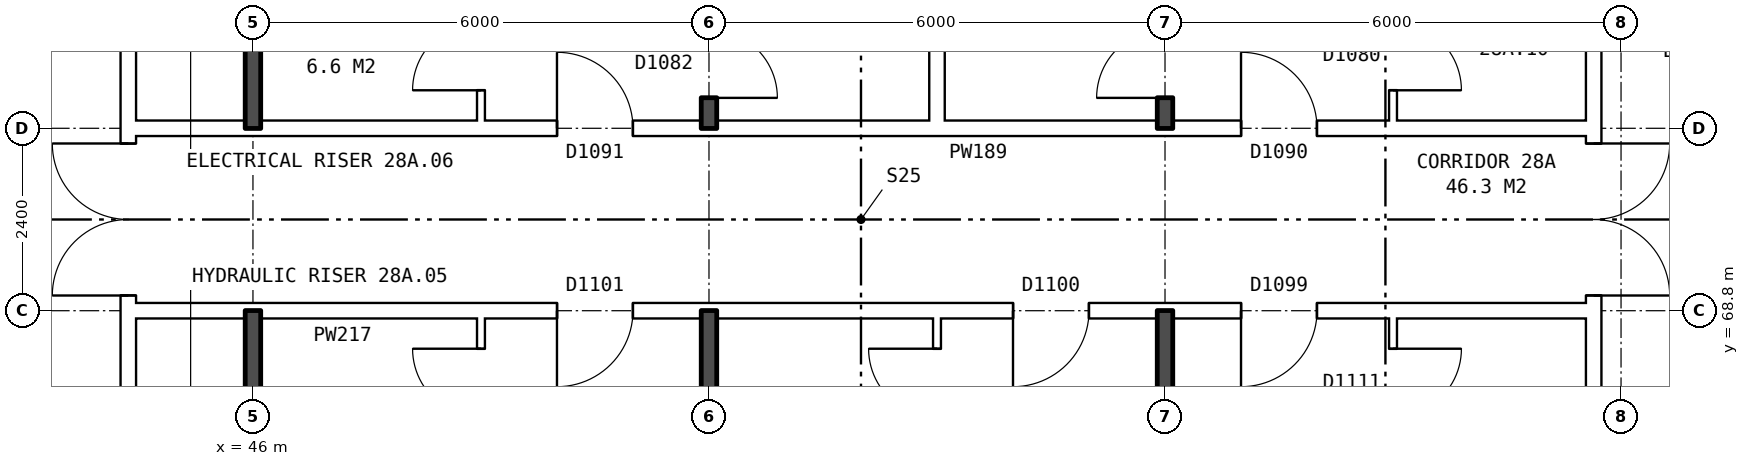
"""IFC4 building model, lengths in metres.
Left out: names, types, materials, properties, quantities, classifications, styles, units other than length and angle.
Written with IfcOpenShell. Run it as: python <this file> out.ifc"""

import sys

from ifc_helpers import new_model, si_unit, direction, frame, frame_2d, origin, place, context, subcontext, project, spatial, rectangle, extrude, element, fill, save


model = new_model("IFC4")
c1 = context("Model", 3, precision=1e-05, world=origin(), true_north=direction((0.0, 1.0)))
c2 = subcontext(c1, "Body", "Model", "MODEL_VIEW")
j1 = project(units=[si_unit("LENGTHUNIT", "METRE"), si_unit("PLANEANGLEUNIT", "RADIAN")], contexts=[c1])
p1 = place(None, origin())
s1 = spatial("IfcSite", under=j1, at=p1, CompositionType="ELEMENT")
p2 = place(p1, origin())
s2 = spatial("IfcBuilding", under=s1, at=p2, CompositionType="ELEMENT")
p3 = place(p2, frame((0.0, 0.0, 102.6)))
s3 = spatial("IfcBuildingStorey", under=s2, at=p3, CompositionType="ELEMENT", Elevation=102.6)
p4 = place(p3, frame((63.64, 63.9, 0.0), z_axis=(0.0, 0.0, 1.0), x_axis=(0.0, 1.0, 0.0)))
e1 = element("IfcWall", 1, at=p4, inside=s3, PredefinedType="PARTITIONING", context=c2, shape_type="SweptSolid", body=[
    extrude(rectangle(XDim=12.2, YDim=0.2, at=frame_2d((6.1, 0.0))), origin(), (0.0, 0.0, 1.0), 2.85),
])
p5 = place(p4, frame((5.1, 0.0, 0.0)))
e2 = element("IfcOpeningElement", 2, at=p5, cuts=e1, PredefinedType="OPENING", context=c2, shape_type="SweptSolid", body=[
    extrude(rectangle(XDim=2.0, YDim=2.1, at=frame_2d((1.0, 1.05))), frame((0.0, 0.11, 0.0), z_axis=(0.0, -1.0, 0.0), x_axis=(1.0, 0.0, 0.0)), (0.0, 0.0, 1.0), 0.22),
])
p6 = place(p3, frame((44.36, 63.9, 0.0), z_axis=(0.0, 0.0, 1.0), x_axis=(0.0, 1.0, 0.0)))
e3 = element("IfcWall", 3, at=p6, inside=s3, PredefinedType="PARTITIONING", context=c2, shape_type="SweptSolid", body=[
    extrude(rectangle(XDim=12.2, YDim=0.2, at=frame_2d((6.1, 0.0))), origin(), (0.0, 0.0, 1.0), 2.85),
])
p7 = place(p6, frame((5.1, 0.0, 0.0)))
e4 = element("IfcOpeningElement", 4, at=p7, cuts=e3, PredefinedType="OPENING", context=c2, shape_type="SweptSolid", body=[
    extrude(rectangle(XDim=2.0, YDim=2.1, at=frame_2d((1.0, 1.05))), frame((0.0, 0.11, 0.0), z_axis=(0.0, -1.0, 0.0), x_axis=(1.0, 0.0, 0.0)), (0.0, 0.0, 1.0), 0.22),
])
p8 = place(p3, frame((44.36, 68.8, 0.0), z_axis=(0.0, 0.0, 1.0), x_axis=(1.0, 0.0, 0.0)))
e5 = element("IfcWall", 5, at=p8, inside=s3, PredefinedType="PARTITIONING", context=c2, shape_type="SweptSolid", body=[
    extrude(rectangle(XDim=19.28, YDim=0.2, at=frame_2d((9.64, 0.0))), origin(), (0.0, 0.0, 1.0), 2.85),
])
p9 = place(p8, frame((14.64, 0.0, 0.0)))
e6 = element("IfcOpeningElement", 6, at=p9, cuts=e5, PredefinedType="OPENING", context=c2, shape_type="SweptSolid", body=[
    extrude(rectangle(XDim=1.0, YDim=2.1, at=frame_2d((0.5, 1.05))), frame((0.0, 0.11, 0.0), z_axis=(0.0, -1.0, 0.0), x_axis=(1.0, 0.0, 0.0)), (0.0, 0.0, 1.0), 0.22),
])
p10 = place(p8, frame((11.64, 0.0, 0.0)))
e7 = element("IfcOpeningElement", 7, at=p10, cuts=e5, PredefinedType="OPENING", context=c2, shape_type="SweptSolid", body=[
    extrude(rectangle(XDim=1.0, YDim=2.1, at=frame_2d((0.5, 1.05))), frame((0.0, 0.11, 0.0), z_axis=(0.0, -1.0, 0.0), x_axis=(1.0, 0.0, 0.0)), (0.0, 0.0, 1.0), 0.22),
])
p11 = place(p8, frame((5.64, 0.0, 0.0)))
e8 = element("IfcOpeningElement", 8, at=p11, cuts=e5, PredefinedType="OPENING", context=c2, shape_type="SweptSolid", body=[
    extrude(rectangle(XDim=1.0, YDim=2.1, at=frame_2d((0.5, 1.05))), frame((0.0, 0.11, 0.0), z_axis=(0.0, -1.0, 0.0), x_axis=(1.0, 0.0, 0.0)), (0.0, 0.0, 1.0), 0.22),
])
p12 = place(p3, frame((44.36, 71.2, 0.0), z_axis=(0.0, 0.0, 1.0), x_axis=(1.0, 0.0, 0.0)))
e9 = element("IfcWall", 9, at=p12, inside=s3, PredefinedType="PARTITIONING", context=c2, shape_type="SweptSolid", body=[
    extrude(rectangle(XDim=19.28, YDim=0.2, at=frame_2d((9.64, 0.0))), origin(), (0.0, 0.0, 1.0), 2.85),
])
p13 = place(p12, frame((14.64, 0.0, 0.0)))
e10 = element("IfcOpeningElement", 10, at=p13, cuts=e9, PredefinedType="OPENING", context=c2, shape_type="SweptSolid", body=[
    extrude(rectangle(XDim=1.0, YDim=2.1, at=frame_2d((0.5, 1.05))), frame((0.0, 0.11, 0.0), z_axis=(0.0, -1.0, 0.0), x_axis=(1.0, 0.0, 0.0)), (0.0, 0.0, 1.0), 0.22),
])
p14 = place(p12, frame((5.64, 0.0, 0.0)))
e11 = element("IfcOpeningElement", 11, at=p14, cuts=e9, PredefinedType="OPENING", context=c2, shape_type="SweptSolid", body=[
    extrude(rectangle(XDim=1.0, YDim=2.1, at=frame_2d((0.5, 1.05))), frame((0.0, 0.11, 0.0), z_axis=(0.0, -1.0, 0.0), x_axis=(1.0, 0.0, 0.0)), (0.0, 0.0, 1.0), 0.22),
])
for number, where, z_axis, x_axis in (
    (12, (46.0, 63.8, 0.0), (0.0, 0.0, 1.0), (0.0, 1.0, 0.0)),
    (13, (46.0, 71.2, 0.0), (0.0, 0.0, 1.0), (0.0, 1.0, 0.0)),
):
    element("IfcWall", number, at=place(p3, frame(where, z_axis=z_axis, x_axis=x_axis)), inside=s3, PredefinedType="SOLIDWALL", context=c2, shape_type="SweptSolid", body=[
        extrude(rectangle(XDim=5.0, YDim=0.2, at=frame_2d((2.5, 0.0))), origin(), (0.0, 0.0, 1.0), 2.85),
    ])
p15 = place(p3, frame((49.0, 54.36, 0.0), z_axis=(0.0, 0.0, 1.0), x_axis=(0.0, 1.0, 0.0)))
e14 = element("IfcWall", 14, at=p15, inside=s3, PredefinedType="PARTITIONING", context=c2, shape_type="SweptSolid", body=[
    extrude(rectangle(XDim=14.34, YDim=0.1, at=frame_2d((7.17, 0.0))), origin(), (0.0, 0.0, 1.0), 2.85),
])
p16 = place(p15, frame((7.7, 0.0, 0.0)))
e15 = element("IfcOpeningElement", 15, at=p16, cuts=e14, PredefinedType="OPENING", context=c2, shape_type="SweptSolid", body=[
    extrude(rectangle(XDim=0.9, YDim=2.1, at=frame_2d((0.45, 1.05))), frame((0.0, 0.06, 0.0), z_axis=(0.0, -1.0, 0.0), x_axis=(1.0, 0.0, 0.0)), (0.0, 0.0, 1.0), 0.12),
])
p17 = place(p15, frame((13.04, 0.0, 0.0)))
e16 = element("IfcOpeningElement", 16, at=p17, cuts=e14, PredefinedType="OPENING", context=c2, shape_type="SweptSolid", body=[
    extrude(rectangle(XDim=0.9, YDim=2.1, at=frame_2d((0.45, 1.05))), frame((0.0, 0.06, 0.0), z_axis=(0.0, -1.0, 0.0), x_axis=(1.0, 0.0, 0.0)), (0.0, 0.0, 1.0), 0.12),
])
p18 = place(p3, frame((49.0, 71.3, 0.0), z_axis=(0.0, 0.0, 1.0), x_axis=(0.0, 1.0, 0.0)))
e17 = element("IfcWall", 17, at=p18, inside=s3, PredefinedType="PARTITIONING", context=c2, shape_type="SweptSolid", body=[
    extrude(rectangle(XDim=14.34, YDim=0.1, at=frame_2d((7.17, 0.0))), origin(), (0.0, 0.0, 1.0), 2.85),
])
p19 = place(p18, frame((7.94, 0.0, 0.0)))
e18 = element("IfcOpeningElement", 18, at=p19, cuts=e17, PredefinedType="OPENING", context=c2, shape_type="SweptSolid", body=[
    extrude(rectangle(XDim=0.9, YDim=2.1, at=frame_2d((0.45, 1.05))), frame((0.0, 0.06, 0.0), z_axis=(0.0, -1.0, 0.0), x_axis=(1.0, 0.0, 0.0)), (0.0, 0.0, 1.0), 0.12),
])
p20 = place(p18, frame((0.4, 0.0, 0.0)))
e19 = element("IfcOpeningElement", 19, at=p20, cuts=e17, PredefinedType="OPENING", context=c2, shape_type="SweptSolid", body=[
    extrude(rectangle(XDim=0.9, YDim=2.1, at=frame_2d((0.45, 1.05))), frame((0.0, 0.06, 0.0), z_axis=(0.0, -1.0, 0.0), x_axis=(1.0, 0.0, 0.0)), (0.0, 0.0, 1.0), 0.12),
])
p21 = place(p3, frame((52.0, 54.36, 0.0), z_axis=(0.0, 0.0, 1.0), x_axis=(0.0, 1.0, 0.0)))
e20 = element("IfcWall", 20, at=p21, inside=s3, PredefinedType="SOLIDWALL", context=c2, shape_type="SweptSolid", body=[
    extrude(rectangle(XDim=14.44, YDim=0.2, at=frame_2d((7.22, 0.0))), origin(), (0.0, 0.0, 1.0), 2.85),
])
p22 = place(p3, frame((52.0, 71.2, 0.0), z_axis=(0.0, 0.0, 1.0), x_axis=(0.0, 1.0, 0.0)))
e21 = element("IfcWall", 21, at=p22, inside=s3, PredefinedType="SOLIDWALL", context=c2, shape_type="SweptSolid", body=[
    extrude(rectangle(XDim=14.44, YDim=0.2, at=frame_2d((7.22, 0.0))), origin(), (0.0, 0.0, 1.0), 2.85),
])
p23 = place(p22, frame((8.04, 0.0, 0.0)))
e22 = element("IfcOpeningElement", 22, at=p23, cuts=e21, PredefinedType="OPENING", context=c2, shape_type="SweptSolid", body=[
    extrude(rectangle(XDim=0.9, YDim=2.1, at=frame_2d((0.45, 1.05))), frame((0.0, 0.11, 0.0), z_axis=(0.0, -1.0, 0.0), x_axis=(1.0, 0.0, 0.0)), (0.0, 0.0, 1.0), 0.22),
])
p24 = place(p22, frame((0.4, 0.0, 0.0)))
e23 = element("IfcOpeningElement", 23, at=p24, cuts=e21, PredefinedType="OPENING", context=c2, shape_type="SweptSolid", body=[
    extrude(rectangle(XDim=0.9, YDim=2.1, at=frame_2d((0.45, 1.05))), frame((0.0, 0.11, 0.0), z_axis=(0.0, -1.0, 0.0), x_axis=(1.0, 0.0, 0.0)), (0.0, 0.0, 1.0), 0.22),
])
p25 = place(p3, frame((55.0, 54.36, 0.0), z_axis=(0.0, 0.0, 1.0), x_axis=(0.0, 1.0, 0.0)))
e24 = element("IfcWall", 24, at=p25, inside=s3, PredefinedType="PARTITIONING", context=c2, shape_type="SweptSolid", body=[
    extrude(rectangle(XDim=14.34, YDim=0.1, at=frame_2d((7.17, 0.0))), origin(), (0.0, 0.0, 1.0), 2.85),
])
p26 = place(p25, frame((4.2, 0.0, 0.0)))
e25 = element("IfcOpeningElement", 25, at=p26, cuts=e24, PredefinedType="OPENING", context=c2, shape_type="SweptSolid", body=[
    extrude(rectangle(XDim=0.9, YDim=2.1, at=frame_2d((0.45, 1.05))), frame((0.0, 0.06, 0.0), z_axis=(0.0, -1.0, 0.0), x_axis=(1.0, 0.0, 0.0)), (0.0, 0.0, 1.0), 0.12),
])
p27 = place(p25, frame((13.04, 0.0, 0.0)))
e26 = element("IfcOpeningElement", 26, at=p27, cuts=e24, PredefinedType="OPENING", context=c2, shape_type="SweptSolid", body=[
    extrude(rectangle(XDim=0.9, YDim=2.1, at=frame_2d((0.45, 1.05))), frame((0.0, 0.06, 0.0), z_axis=(0.0, -1.0, 0.0), x_axis=(1.0, 0.0, 0.0)), (0.0, 0.0, 1.0), 0.12),
])
p28 = place(p3, frame((55.0, 71.3, 0.0), z_axis=(0.0, 0.0, 1.0), x_axis=(0.0, 1.0, 0.0)))
e27 = element("IfcWall", 27, at=p28, inside=s3, PredefinedType="PARTITIONING", context=c2, shape_type="SweptSolid", body=[
    extrude(rectangle(XDim=14.34, YDim=0.2, at=frame_2d((7.17, 0.0))), origin(), (0.0, 0.0, 1.0), 2.85),
])
p29 = place(p3, frame((58.0, 54.36, 0.0), z_axis=(0.0, 0.0, 1.0), x_axis=(0.0, 1.0, 0.0)))
e28 = element("IfcWall", 28, at=p29, inside=s3, PredefinedType="SOLIDWALL", context=c2, shape_type="SweptSolid", body=[
    extrude(rectangle(XDim=14.44, YDim=0.2, at=frame_2d((7.22, 0.0))), origin(), (0.0, 0.0, 1.0), 2.85),
])
p30 = place(p3, frame((58.0, 71.2, 0.0), z_axis=(0.0, 0.0, 1.0), x_axis=(0.0, 1.0, 0.0)))
e29 = element("IfcWall", 29, at=p30, inside=s3, PredefinedType="SOLIDWALL", context=c2, shape_type="SweptSolid", body=[
    extrude(rectangle(XDim=14.44, YDim=0.2, at=frame_2d((7.22, 0.0))), origin(), (0.0, 0.0, 1.0), 2.85),
])
p31 = place(p30, frame((9.34, 0.0, 0.0)))
e30 = element("IfcOpeningElement", 30, at=p31, cuts=e29, PredefinedType="OPENING", context=c2, shape_type="SweptSolid", body=[
    extrude(rectangle(XDim=0.9, YDim=2.1, at=frame_2d((0.45, 1.05))), frame((0.0, 0.11, 0.0), z_axis=(0.0, -1.0, 0.0), x_axis=(1.0, 0.0, 0.0)), (0.0, 0.0, 1.0), 0.22),
])
p32 = place(p30, frame((0.4, 0.0, 0.0)))
e31 = element("IfcOpeningElement", 31, at=p32, cuts=e29, PredefinedType="OPENING", context=c2, shape_type="SweptSolid", body=[
    extrude(rectangle(XDim=0.9, YDim=2.1, at=frame_2d((0.45, 1.05))), frame((0.0, 0.11, 0.0), z_axis=(0.0, -1.0, 0.0), x_axis=(1.0, 0.0, 0.0)), (0.0, 0.0, 1.0), 0.22),
])
p33 = place(p3, frame((61.0, 54.36, 0.0), z_axis=(0.0, 0.0, 1.0), x_axis=(0.0, 1.0, 0.0)))
e32 = element("IfcWall", 32, at=p33, inside=s3, PredefinedType="PARTITIONING", context=c2, shape_type="SweptSolid", body=[
    extrude(rectangle(XDim=14.34, YDim=0.1, at=frame_2d((7.17, 0.0))), origin(), (0.0, 0.0, 1.0), 2.85),
])
p34 = place(p33, frame((4.2, 0.0, 0.0)))
e33 = element("IfcOpeningElement", 33, at=p34, cuts=e32, PredefinedType="OPENING", context=c2, shape_type="SweptSolid", body=[
    extrude(rectangle(XDim=0.9, YDim=2.1, at=frame_2d((0.45, 1.05))), frame((0.0, 0.06, 0.0), z_axis=(0.0, -1.0, 0.0), x_axis=(1.0, 0.0, 0.0)), (0.0, 0.0, 1.0), 0.12),
])
p35 = place(p33, frame((13.04, 0.0, 0.0)))
e34 = element("IfcOpeningElement", 34, at=p35, cuts=e32, PredefinedType="OPENING", context=c2, shape_type="SweptSolid", body=[
    extrude(rectangle(XDim=0.9, YDim=2.1, at=frame_2d((0.45, 1.05))), frame((0.0, 0.06, 0.0), z_axis=(0.0, -1.0, 0.0), x_axis=(1.0, 0.0, 0.0)), (0.0, 0.0, 1.0), 0.12),
])
p36 = place(p3, frame((61.0, 71.3, 0.0), z_axis=(0.0, 0.0, 1.0), x_axis=(0.0, 1.0, 0.0)))
e35 = element("IfcWall", 35, at=p36, inside=s3, PredefinedType="PARTITIONING", context=c2, shape_type="SweptSolid", body=[
    extrude(rectangle(XDim=14.34, YDim=0.1, at=frame_2d((7.17, 0.0))), origin(), (0.0, 0.0, 1.0), 2.85),
])
p37 = place(p36, frame((9.24, 0.0, 0.0)))
e36 = element("IfcOpeningElement", 36, at=p37, cuts=e35, PredefinedType="OPENING", context=c2, shape_type="SweptSolid", body=[
    extrude(rectangle(XDim=0.9, YDim=2.1, at=frame_2d((0.45, 1.05))), frame((0.0, 0.06, 0.0), z_axis=(0.0, -1.0, 0.0), x_axis=(1.0, 0.0, 0.0)), (0.0, 0.0, 1.0), 0.12),
])
p38 = place(p36, frame((0.4, 0.0, 0.0)))
e37 = element("IfcOpeningElement", 37, at=p38, cuts=e35, PredefinedType="OPENING", context=c2, shape_type="SweptSolid", body=[
    extrude(rectangle(XDim=0.9, YDim=2.1, at=frame_2d((0.45, 1.05))), frame((0.0, 0.06, 0.0), z_axis=(0.0, -1.0, 0.0), x_axis=(1.0, 0.0, 0.0)), (0.0, 0.0, 1.0), 0.12),
])
p39 = place(p5, frame((2.0, 0.0, 0.0), z_axis=(0.0, 0.0, 1.0), x_axis=(-1.0, 0.0, 0.0)))
e38 = element("IfcDoor", 38, at=p39, inside=s3, OperationType="DOUBLE_DOOR_SINGLE_SWING", PredefinedType="DOOR", context=c2, shape_type="SweptSolid", body=[
    extrude(rectangle(XDim=2.0, YDim=2.1, at=frame_2d((1.0, 1.05))), frame((0.0, 0.025, 0.0), z_axis=(0.0, -1.0, 0.0), x_axis=(1.0, 0.0, 0.0)), (0.0, 0.0, 1.0), 0.05),
])
fill(e2, e38)
p40 = place(p7, origin())
e39 = element("IfcDoor", 39, at=p40, inside=s3, OperationType="DOUBLE_DOOR_SINGLE_SWING", PredefinedType="DOOR", context=c2, shape_type="SweptSolid", body=[
    extrude(rectangle(XDim=2.0, YDim=2.1, at=frame_2d((1.0, 1.05))), frame((0.0, 0.025, 0.0), z_axis=(0.0, -1.0, 0.0), x_axis=(1.0, 0.0, 0.0)), (0.0, 0.0, 1.0), 0.05),
])
fill(e4, e39)
p41 = place(p9, frame((1.0, 0.0, 0.0), z_axis=(0.0, 0.0, 1.0), x_axis=(-1.0, 0.0, 0.0)))
e40 = element("IfcDoor", 40, at=p41, inside=s3, OperationType="SINGLE_SWING_RIGHT", PredefinedType="DOOR", context=c2, shape_type="SweptSolid", body=[
    extrude(rectangle(XDim=1.0, YDim=2.1, at=frame_2d((0.5, 1.05))), frame((0.0, 0.025, 0.0), z_axis=(0.0, -1.0, 0.0), x_axis=(1.0, 0.0, 0.0)), (0.0, 0.0, 1.0), 0.05),
])
fill(e6, e40)
p42 = place(p35, frame((0.9, 0.0, 0.0), z_axis=(0.0, 0.0, 1.0), x_axis=(-1.0, 0.0, 0.0)))
e41 = element("IfcDoor", 41, at=p42, inside=s3, OperationType="SINGLE_SWING_LEFT", PredefinedType="DOOR", context=c2, shape_type="SweptSolid", body=[
    extrude(rectangle(XDim=0.9, YDim=2.1, at=frame_2d((0.45, 1.05))), frame((0.0, 0.025, 0.0), z_axis=(0.0, -1.0, 0.0), x_axis=(1.0, 0.0, 0.0)), (0.0, 0.0, 1.0), 0.05),
])
fill(e34, e41)
p43 = place(p10, frame((1.0, 0.0, 0.0), z_axis=(0.0, 0.0, 1.0), x_axis=(-1.0, 0.0, 0.0)))
e42 = element("IfcDoor", 42, at=p43, inside=s3, OperationType="SINGLE_SWING_RIGHT", PredefinedType="DOOR", context=c2, shape_type="SweptSolid", body=[
    extrude(rectangle(XDim=1.0, YDim=2.1, at=frame_2d((0.5, 1.05))), frame((0.0, 0.025, 0.0), z_axis=(0.0, -1.0, 0.0), x_axis=(1.0, 0.0, 0.0)), (0.0, 0.0, 1.0), 0.05),
])
fill(e7, e42)
p44 = place(p27, origin())
e43 = element("IfcDoor", 43, at=p44, inside=s3, OperationType="SINGLE_SWING_RIGHT", PredefinedType="DOOR", context=c2, shape_type="SweptSolid", body=[
    extrude(rectangle(XDim=0.9, YDim=2.1, at=frame_2d((0.45, 1.05))), frame((0.0, 0.025, 0.0), z_axis=(0.0, -1.0, 0.0), x_axis=(1.0, 0.0, 0.0)), (0.0, 0.0, 1.0), 0.05),
])
fill(e26, e43)
p45 = place(p11, frame((1.0, 0.0, 0.0), z_axis=(0.0, 0.0, 1.0), x_axis=(-1.0, 0.0, 0.0)))
e44 = element("IfcDoor", 44, at=p45, inside=s3, OperationType="SINGLE_SWING_RIGHT", PredefinedType="DOOR", context=c2, shape_type="SweptSolid", body=[
    extrude(rectangle(XDim=1.0, YDim=2.1, at=frame_2d((0.5, 1.05))), frame((0.0, 0.025, 0.0), z_axis=(0.0, -1.0, 0.0), x_axis=(1.0, 0.0, 0.0)), (0.0, 0.0, 1.0), 0.05),
])
fill(e8, e44)
p46 = place(p17, origin())
e45 = element("IfcDoor", 45, at=p46, inside=s3, OperationType="SINGLE_SWING_RIGHT", PredefinedType="DOOR", context=c2, shape_type="SweptSolid", body=[
    extrude(rectangle(XDim=0.9, YDim=2.1, at=frame_2d((0.45, 1.05))), frame((0.0, 0.025, 0.0), z_axis=(0.0, -1.0, 0.0), x_axis=(1.0, 0.0, 0.0)), (0.0, 0.0, 1.0), 0.05),
])
fill(e16, e45)
p47 = place(p13, origin())
e46 = element("IfcDoor", 46, at=p47, inside=s3, OperationType="SINGLE_SWING_LEFT", PredefinedType="DOOR", context=c2, shape_type="SweptSolid", body=[
    extrude(rectangle(XDim=1.0, YDim=2.1, at=frame_2d((0.5, 1.05))), frame((0.0, 0.025, 0.0), z_axis=(0.0, -1.0, 0.0), x_axis=(1.0, 0.0, 0.0)), (0.0, 0.0, 1.0), 0.05),
])
fill(e10, e46)
p48 = place(p38, frame((0.9, 0.0, 0.0), z_axis=(0.0, 0.0, 1.0), x_axis=(-1.0, 0.0, 0.0)))
e47 = element("IfcDoor", 47, at=p48, inside=s3, OperationType="SINGLE_SWING_RIGHT", PredefinedType="DOOR", context=c2, shape_type="SweptSolid", body=[
    extrude(rectangle(XDim=0.9, YDim=2.1, at=frame_2d((0.45, 1.05))), frame((0.0, 0.025, 0.0), z_axis=(0.0, -1.0, 0.0), x_axis=(1.0, 0.0, 0.0)), (0.0, 0.0, 1.0), 0.05),
])
fill(e37, e47)
p49 = place(p32, origin())
e48 = element("IfcDoor", 48, at=p49, inside=s3, OperationType="SINGLE_SWING_LEFT", PredefinedType="DOOR", context=c2, shape_type="SweptSolid", body=[
    extrude(rectangle(XDim=0.9, YDim=2.1, at=frame_2d((0.45, 1.05))), frame((0.0, 0.025, 0.0), z_axis=(0.0, -1.0, 0.0), x_axis=(1.0, 0.0, 0.0)), (0.0, 0.0, 1.0), 0.05),
])
fill(e31, e48)
p50 = place(p14, origin())
e49 = element("IfcDoor", 49, at=p50, inside=s3, OperationType="SINGLE_SWING_LEFT", PredefinedType="DOOR", context=c2, shape_type="SweptSolid", body=[
    extrude(rectangle(XDim=1.0, YDim=2.1, at=frame_2d((0.5, 1.05))), frame((0.0, 0.025, 0.0), z_axis=(0.0, -1.0, 0.0), x_axis=(1.0, 0.0, 0.0)), (0.0, 0.0, 1.0), 0.05),
])
fill(e11, e49)
p51 = place(p24, frame((0.9, 0.0, 0.0), z_axis=(0.0, 0.0, 1.0), x_axis=(-1.0, 0.0, 0.0)))
e50 = element("IfcDoor", 50, at=p51, inside=s3, OperationType="SINGLE_SWING_RIGHT", PredefinedType="DOOR", context=c2, shape_type="SweptSolid", body=[
    extrude(rectangle(XDim=0.9, YDim=2.1, at=frame_2d((0.45, 1.05))), frame((0.0, 0.025, 0.0), z_axis=(0.0, -1.0, 0.0), x_axis=(1.0, 0.0, 0.0)), (0.0, 0.0, 1.0), 0.05),
])
fill(e23, e50)
p52 = place(p20, origin())
e51 = element("IfcDoor", 51, at=p52, inside=s3, OperationType="SINGLE_SWING_LEFT", PredefinedType="DOOR", context=c2, shape_type="SweptSolid", body=[
    extrude(rectangle(XDim=0.9, YDim=2.1, at=frame_2d((0.45, 1.05))), frame((0.0, 0.025, 0.0), z_axis=(0.0, -1.0, 0.0), x_axis=(1.0, 0.0, 0.0)), (0.0, 0.0, 1.0), 0.05),
])
fill(e19, e51)
save(model, sys.argv[1])
